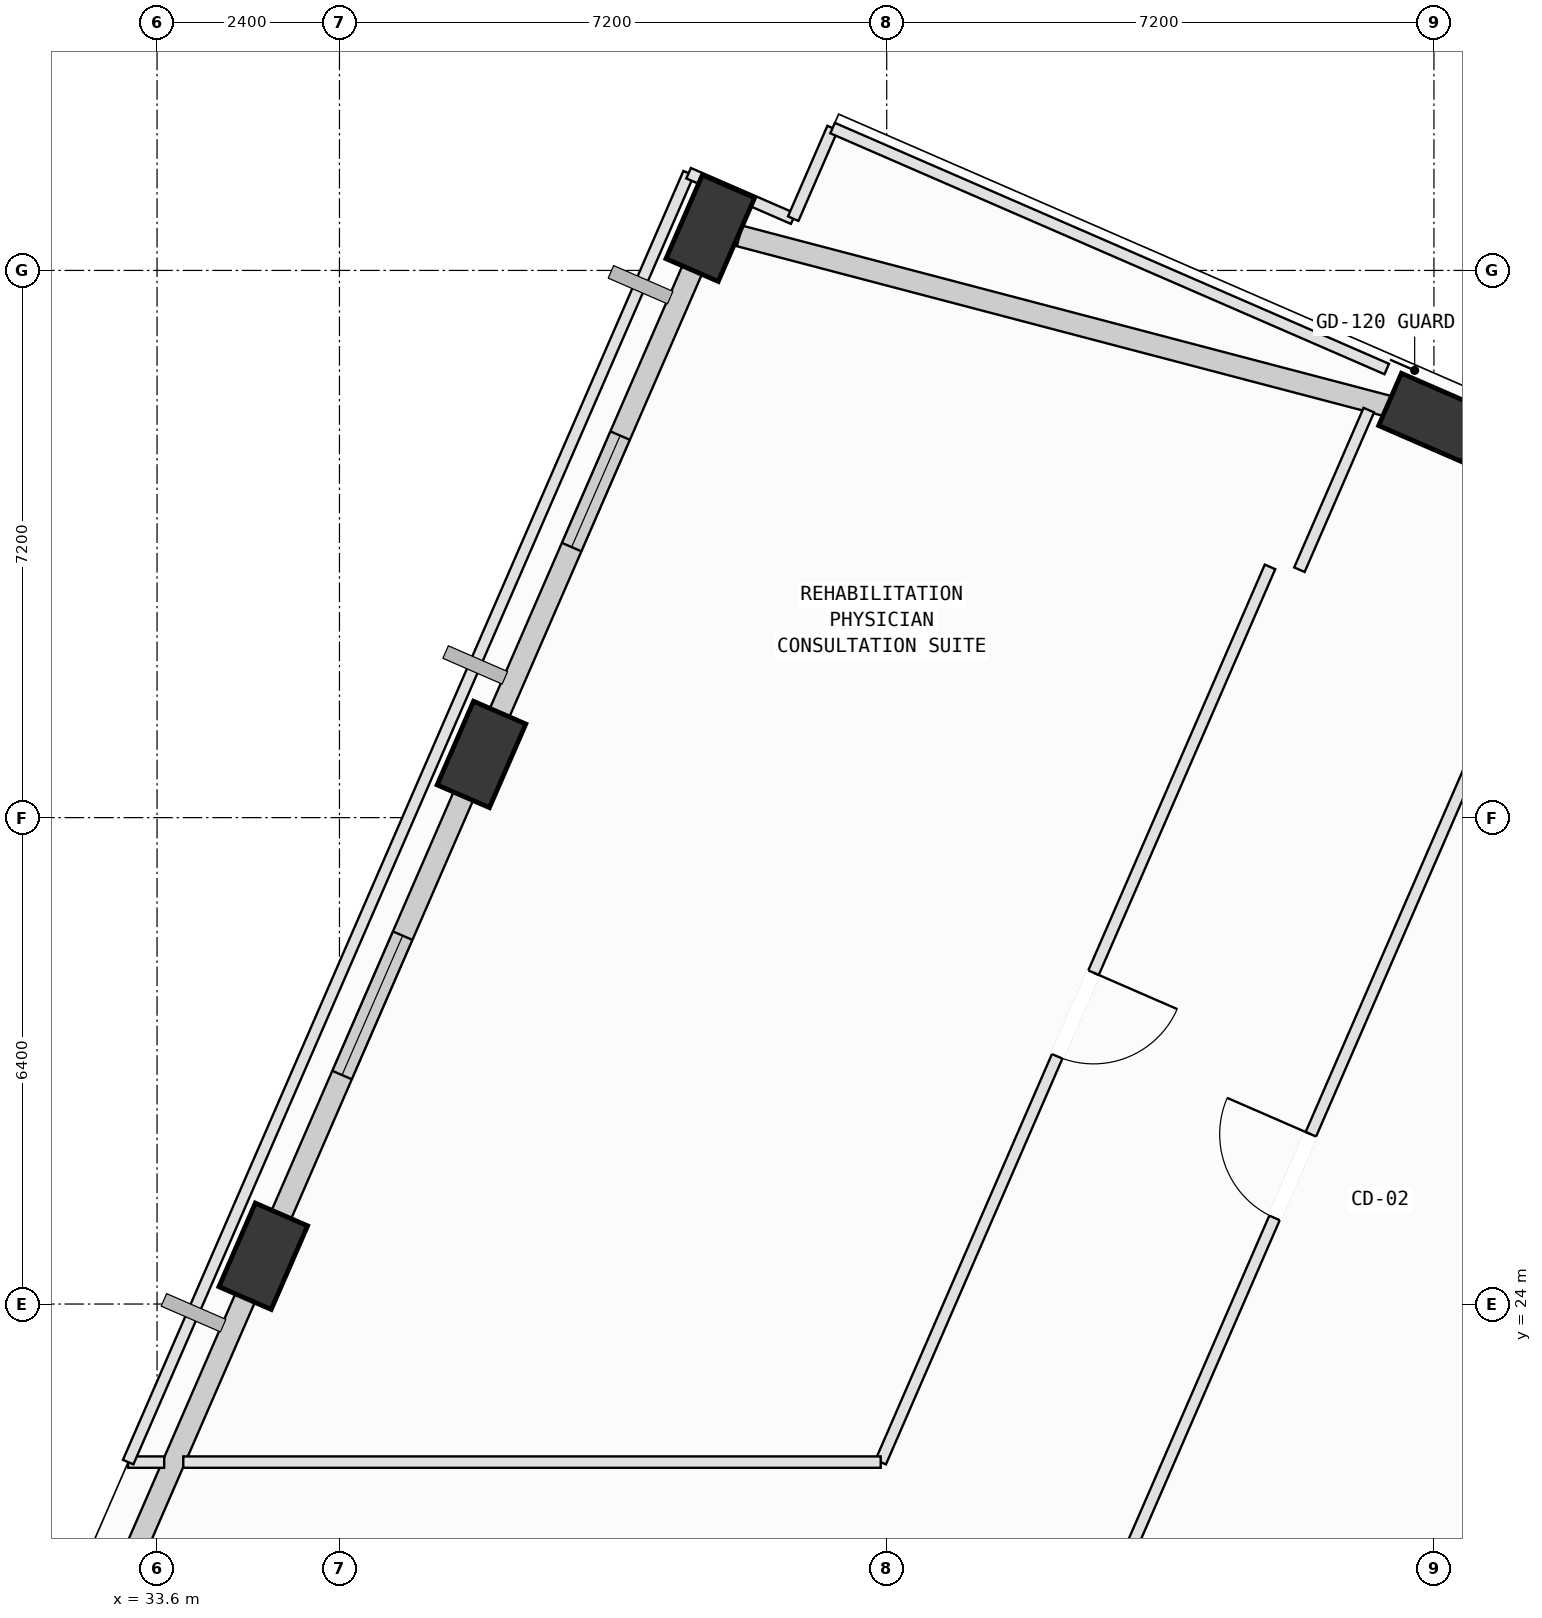
"""IFC4 building model, lengths in metres.
Left out: names, types, materials, properties, quantities, classifications, styles, units other than length and angle.
Written with IfcOpenShell. Run it as: python <this file> out.ifc"""

import sys

from ifc_helpers import new_model, si_unit, direction, frame, frame_2d, origin, origin_2d, place, context, subcontext, project, spatial, rectangle, extrude, element, fill, save


model = new_model("IFC4")
c1 = context("Model", 3, precision=1e-05, world=origin(), true_north=direction((0.0, 1.0)))
c2 = subcontext(c1, "Body", "Model", "MODEL_VIEW")
j1 = project(units=[si_unit("LENGTHUNIT", "METRE"), si_unit("PLANEANGLEUNIT", "RADIAN")], contexts=[c1])
p1 = place(None, origin())
s1 = spatial("IfcSite", under=j1, at=p1, CompositionType="ELEMENT")
p2 = place(p1, origin())
s2 = spatial("IfcBuilding", under=s1, at=p2, CompositionType="ELEMENT")
p3 = place(p2, frame((0.0, 0.0, 328.6)))
s3 = spatial("IfcBuildingStorey", under=s2, at=p3, CompositionType="ELEMENT", Elevation=328.6)
for number, where, z_axis, x_axis in (
    (1, (50.373, 35.663, 0.002), (0.0, 0.0, 1.0), (-0.917, 0.399, 0.0)),
    (2, (40.879, 38.155, 0.002), (0.0, 0.0, 1.0), (0.399, 0.917, 0.0)),
    (3, (37.868, 31.231, 0.002), (0.0, 0.0, 1.0), (0.399, 0.917, 0.0)),
    (4, (34.998, 24.628, 0.002), (0.0, 0.0, 1.0), (0.399, 0.917, 0.0)),
):
    element("IfcColumn", number, at=place(p3, frame(where, z_axis=z_axis, x_axis=x_axis)), inside=s3, PredefinedType="COLUMN", context=c2, shape_type="SweptSolid", body=[
        extrude(rectangle(XDim=1.2, YDim=0.75, at=origin_2d()), origin(), (0.0, 0.0, 1.0), 4.796),
    ])
p4 = place(p3, frame((50.737, 35.504, 0.0), z_axis=(0.0, 0.0, 1.0), x_axis=(0.917057311373, -0.398755423359, 0.0)))
e5 = element("IfcWall", 5, at=p4, inside=s3, PredefinedType="SOLIDWALL", context=c2, shape_type="SweptSolid", body=[
    extrude(rectangle(XDim=7.005, YDim=0.28, at=frame_2d((3.502, 0.0))), origin(), (0.0, 0.0, 1.0), 4.065),
])
p5 = place(p3, frame((41.264, 38.054, 0.0), z_axis=(0.0, 0.0, 1.0), x_axis=(0.967228971308, -0.253905724755, 0.0)))
e6 = element("IfcWall", 6, at=p5, inside=s3, PredefinedType="SOLIDWALL", context=c2, shape_type="SweptSolid", body=[
    extrude(rectangle(XDim=9.02, YDim=0.28, at=frame_2d((4.51, 0.0))), origin(), (0.0, 0.0, 1.0), 4.065),
])
p6 = place(p3, frame((38.027, 31.596, 0.0), z_axis=(0.0, 0.0, 1.0), x_axis=(0.398764437463, 0.917053391802, 0.0)))
e7 = element("IfcWall", 7, at=p6, inside=s3, PredefinedType="SOLIDWALL", context=c2, shape_type="SweptSolid", body=[
    extrude(rectangle(XDim=6.755, YDim=0.28, at=frame_2d((3.377, 0.0))), origin(), (0.0, 0.0, 1.0), 4.065),
])
p7 = place(p6, frame((2.577, 0.0, 0.75)))
e8 = element("IfcOpeningElement", 8, at=p7, cuts=e7, PredefinedType="OPENING", context=c2, shape_type="SweptSolid", body=[
    extrude(rectangle(XDim=1.6, YDim=1.95, at=frame_2d((0.8, 0.975))), frame((0.0, 0.15, 0.0), z_axis=(0.0, -1.0, 0.0), x_axis=(1.0, 0.0, 0.0)), (0.0, 0.0, 1.0), 0.3),
])
p8 = place(p3, frame((35.156, 24.993, 0.0), z_axis=(0.0, 0.0, 1.0), x_axis=(0.398758169539, 0.917056117272, 0.0)))
e9 = element("IfcWall", 9, at=p8, inside=s3, PredefinedType="SOLIDWALL", context=c2, shape_type="SweptSolid", body=[
    extrude(rectangle(XDim=6.405, YDim=0.28, at=frame_2d((3.202, 0.0))), origin(), (0.0, 0.0, 1.0), 4.065),
])
p9 = place(p8, frame((2.202, 0.0, 0.75)))
e10 = element("IfcOpeningElement", 10, at=p9, cuts=e9, PredefinedType="OPENING", context=c2, shape_type="SweptSolid", body=[
    extrude(rectangle(XDim=2.0, YDim=1.95, at=frame_2d((1.0, 0.975))), frame((0.0, 0.15, 0.0), z_axis=(0.0, -1.0, 0.0), x_axis=(1.0, 0.0, 0.0)), (0.0, 0.0, 1.0), 0.3),
])
p10 = place(p3, frame((32.385, 18.619, 0.0), z_axis=(0.0, 0.0, 1.0), x_axis=(0.398753668733, 0.917058074318, 0.0)))
e11 = element("IfcWall", 11, at=p10, inside=s3, PredefinedType="SOLIDWALL", context=c2, shape_type="SweptSolid", body=[
    extrude(rectangle(XDim=6.155, YDim=0.28, at=frame_2d((3.078, 0.0))), origin(), (0.0, 0.0, 1.0), 4.065),
])
p11 = place(p10, frame((0.875, 0.0, 0.75)))
e12 = element("IfcOpeningElement", 12, at=p11, cuts=e11, PredefinedType="OPENING", context=c2, shape_type="SweptSolid", body=[
    extrude(rectangle(XDim=1.4, YDim=1.85, at=frame_2d((0.7, 0.925))), frame((0.0, 0.15, 0.0), z_axis=(0.0, -1.0, 0.0), x_axis=(1.0, 0.0, 0.0)), (0.0, 0.0, 1.0), 0.3),
])
p12 = place(p3, frame((44.647, 16.726, 0.0), z_axis=(0.0, 0.0, 1.0), x_axis=(0.398722455525, 0.917071645762, 0.0)))
e13 = element("IfcWall", 13, at=p12, inside=s3, PredefinedType="PARTITIONING", context=c2, shape_type="SweptSolid", body=[
    extrude(rectangle(XDim=19.535, YDim=0.15, at=frame_2d((9.768, 0.0))), origin(), (0.0, 0.0, 1.0), 4.215),
])
p13 = place(p12, frame((9.167, 0.0, 0.0)))
e14 = element("IfcOpeningElement", 14, at=p13, cuts=e13, PredefinedType="OPENING", context=c2, shape_type="SweptSolid", body=[
    extrude(rectangle(XDim=1.2, YDim=2.15, at=frame_2d((0.6, 1.075))), frame((0.0, 0.085, 0.0), z_axis=(0.0, -1.0, 0.0), x_axis=(1.0, 0.0, 0.0)), (0.0, 0.0, 1.0), 0.17),
])
p14 = place(p3, frame((48.243, 33.699, 0.0), z_axis=(0.0, 0.0, 1.0), x_axis=(-0.398758777505, -0.917055852913, 0.0)))
e15 = element("IfcWall", 15, at=p14, inside=s3, PredefinedType="PARTITIONING", context=c2, shape_type="SweptSolid", body=[
    extrude(rectangle(XDim=12.844, YDim=0.15, at=frame_2d((6.422, 0.0))), origin(), (0.0, 0.0, 1.0), 3.565),
])
p15 = place(p14, frame((5.822, 0.0, 0.0)))
e16 = element("IfcOpeningElement", 16, at=p15, cuts=e15, PredefinedType="OPENING", context=c2, shape_type="SweptSolid", body=[
    extrude(rectangle(XDim=1.2, YDim=2.15, at=frame_2d((0.6, 1.075))), frame((0.0, 0.085, 0.0), z_axis=(0.0, -1.0, 0.0), x_axis=(1.0, 0.0, 0.0)), (0.0, 0.0, 1.0), 0.17),
])
p16 = place(p3, frame((43.121, 21.92, 0.0), z_axis=(0.0, 0.0, 1.0), x_axis=(-1.0, 0.0, 0.0)))
e17 = element("IfcWall", 17, at=p16, inside=s3, PredefinedType="PARTITIONING", context=c2, shape_type="SweptSolid", body=[
    extrude(rectangle(XDim=9.176, YDim=0.15, at=frame_2d((4.588, 0.0))), origin(), (0.0, 0.0, 1.0), 4.58),
])
p17 = place(p3, frame((33.694, 21.92, 0.0), z_axis=(0.0, 0.0, 1.0), x_axis=(-1.0, 0.0, 0.0)))
e18 = element("IfcWall", 18, at=p17, inside=s3, PredefinedType="PARTITIONING", context=c2, shape_type="SweptSolid", body=[
    extrude(rectangle(XDim=0.474, YDim=0.15, at=frame_2d((0.237, 0.0))), origin(), (0.0, 0.0, 1.0), 4.58),
])
p18 = place(p3, frame((33.22, 21.92, 0.0), z_axis=(0.0, 0.0, 1.0), x_axis=(0.39875121383, 0.917059141751, 0.0)))
e19 = element("IfcWall", 19, at=p18, inside=s3, PredefinedType="PARTITIONING", context=c2, shape_type="SweptSolid", body=[
    extrude(rectangle(XDim=18.493, YDim=0.15, at=frame_2d((9.246, 0.0))), origin(), (0.0, 0.0, 1.0), 4.58),
])
p19 = place(p3, frame((40.594, 38.879, 0.0), z_axis=(0.0, 0.0, 1.0), x_axis=(0.91715541112, -0.398529737728, 0.0)))
e20 = element("IfcWall", 20, at=p19, inside=s3, PredefinedType="PARTITIONING", context=c2, shape_type="SweptSolid", body=[
    extrude(rectangle(XDim=1.5, YDim=0.15, at=frame_2d((0.75, 0.0))), origin(), (0.0, 0.0, 1.0), 4.065),
])
p20 = place(p3, frame((41.97, 38.281, 0.0), z_axis=(0.0, 0.0, 1.0), x_axis=(0.398629941404, 0.917111863306, 0.0)))
e21 = element("IfcWall", 21, at=p20, inside=s3, PredefinedType="PARTITIONING", context=c2, shape_type="SweptSolid", body=[
    extrude(rectangle(XDim=1.3, YDim=0.15, at=frame_2d((0.65, 0.0))), origin(), (0.0, 0.0, 1.0), 4.58),
])
p21 = place(p3, frame((42.488, 39.473, 0.0), z_axis=(0.0, 0.0, 1.0), x_axis=(0.917073961881, -0.398717128351, 0.0)))
e22 = element("IfcWall", 22, at=p21, inside=s3, PredefinedType="PARTITIONING", context=c2, shape_type="SweptSolid", body=[
    extrude(rectangle(XDim=7.95, YDim=0.15, at=frame_2d((3.975, 0.0))), origin(), (0.0, 0.0, 1.0), 4.58),
])
p22 = place(p3, frame((49.543, 35.762, 0.0), z_axis=(0.0, 0.0, 1.0), x_axis=(-0.398765098315, -0.917053104441, 0.0)))
e23 = element("IfcWall", 23, at=p22, inside=s3, PredefinedType="PARTITIONING", context=c2, shape_type="SweptSolid", body=[
    extrude(rectangle(XDim=2.29, YDim=0.15, at=frame_2d((1.145, 0.0))), origin(), (0.0, 0.0, 1.0), 3.565),
])
p23 = place(p7, origin())
e24 = element("IfcWindow", 24, at=p23, inside=s3, PartitioningType="SINGLE_PANEL", PredefinedType="WINDOW", context=c2, shape_type="SweptSolid", body=[
    extrude(rectangle(XDim=1.6, YDim=1.95, at=frame_2d((0.8, 0.975))), frame((0.0, 0.03, 0.0), z_axis=(0.0, -1.0, 0.0), x_axis=(1.0, 0.0, 0.0)), (0.0, 0.0, 1.0), 0.06),
])
fill(e8, e24)
p24 = place(p9, origin())
e25 = element("IfcWindow", 25, at=p24, inside=s3, PartitioningType="SINGLE_PANEL", PredefinedType="WINDOW", context=c2, shape_type="SweptSolid", body=[
    extrude(rectangle(XDim=2.0, YDim=1.95, at=frame_2d((1.0, 0.975))), frame((0.0, 0.03, 0.0), z_axis=(0.0, -1.0, 0.0), x_axis=(1.0, 0.0, 0.0)), (0.0, 0.0, 1.0), 0.06),
])
fill(e10, e25)
p25 = place(p13, origin())
e26 = element("IfcDoor", 26, at=p25, inside=s3, OperationType="SINGLE_SWING_RIGHT", PredefinedType="DOOR", context=c2, shape_type="SweptSolid", body=[
    extrude(rectangle(XDim=1.2, YDim=2.15, at=frame_2d((0.6, 1.075))), frame((0.0, 0.025, 0.0), z_axis=(0.0, -1.0, 0.0), x_axis=(1.0, 0.0, 0.0)), (0.0, 0.0, 1.0), 0.05),
])
fill(e14, e26)
p26 = place(p15, origin())
e27 = element("IfcDoor", 27, at=p26, inside=s3, OperationType="SINGLE_SWING_LEFT", PredefinedType="DOOR", context=c2, shape_type="SweptSolid", body=[
    extrude(rectangle(XDim=1.2, YDim=2.15, at=frame_2d((0.6, 1.075))), frame((0.0, 0.025, 0.0), z_axis=(0.0, -1.0, 0.0), x_axis=(1.0, 0.0, 0.0)), (0.0, 0.0, 1.0), 0.05),
])
fill(e16, e27)
save(model, sys.argv[1])
